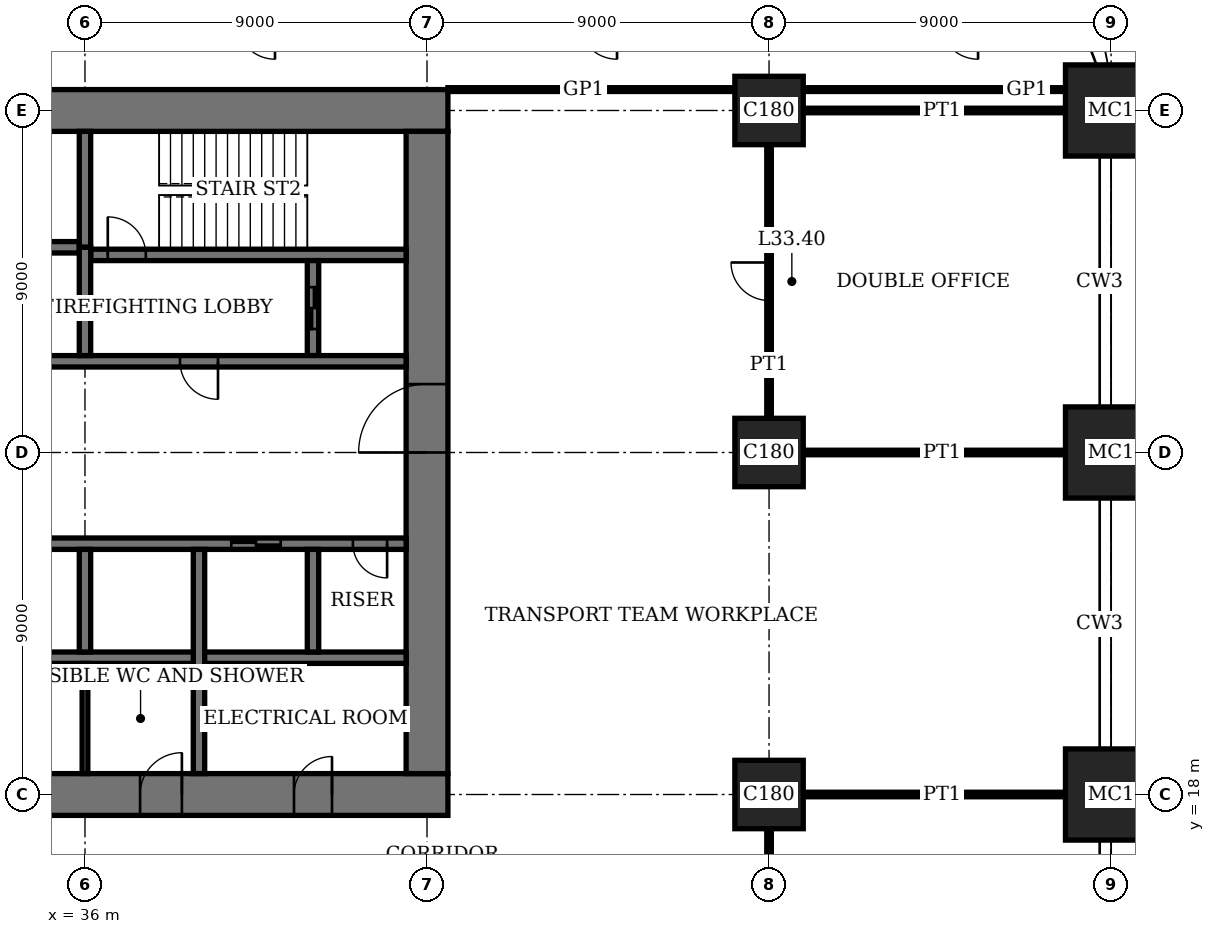
"""IFC4 building model, lengths in metres.
Left out: names, types, materials, properties, quantities, classifications, styles, units other than length and angle.
Written with IfcOpenShell. Run it as: python <this file> out.ifc"""

import sys

from ifc_helpers import new_model, si_unit, direction, frame, frame_2d, origin, origin_2d, place, context, subcontext, project, spatial, rectangle, extrude, element, fill, save


model = new_model("IFC4")
c1 = context("Model", 3, precision=1e-05, world=origin(), true_north=direction((0.0, 1.0)))
c2 = subcontext(c1, "Body", "Model", "MODEL_VIEW")
j1 = project(units=[si_unit("LENGTHUNIT", "METRE"), si_unit("PLANEANGLEUNIT", "RADIAN")], contexts=[c1])
p1 = place(None, origin())
s1 = spatial("IfcSite", under=j1, at=p1, CompositionType="ELEMENT")
p2 = place(p1, origin())
s2 = spatial("IfcBuilding", under=s1, at=p2, CompositionType="ELEMENT")
p3 = place(p2, frame((0.0, 0.0, 137.0)))
s3 = spatial("IfcBuildingStorey", under=s2, at=p3, CompositionType="ELEMENT", Elevation=137.0)
for number, where, z_axis, x_axis in (
    (1, (54.0, 18.0, 0.0), (0.0, 0.0, 1.0), (1.0, 0.0, 0.0)),
    (2, (54.0, 27.0, 0.0), (0.0, 0.0, 1.0), (1.0, 0.0, 0.0)),
    (3, (54.0, 36.0, 0.0), (0.0, 0.0, 1.0), (1.0, 0.0, 0.0)),
):
    element("IfcColumn", number, at=place(p3, frame(where, z_axis=z_axis, x_axis=x_axis)), inside=s3, PredefinedType="COLUMN", context=c2, shape_type="SweptSolid", body=[
        extrude(rectangle(XDim=1.8, YDim=1.8, at=origin_2d()), origin(), (0.0, 0.0, 1.0), 4.0),
    ])
for number, where, z_axis, x_axis in (
    (4, (63.0, 18.0, 0.0), (0.0, 0.0, 1.0), (1.0, 0.0, 0.0)),
    (5, (63.0, 27.0, 0.0), (0.0, 0.0, 1.0), (1.0, 0.0, 0.0)),
    (6, (63.0, 36.0, 0.0), (0.0, 0.0, 1.0), (1.0, 0.0, 0.0)),
):
    element("IfcColumn", number, at=place(p3, frame(where, z_axis=z_axis, x_axis=x_axis)), inside=s3, PredefinedType="COLUMN", context=c2, shape_type="SweptSolid", body=[
        extrude(rectangle(XDim=2.4, YDim=2.4, at=origin_2d()), origin(), (0.0, 0.0, 1.0), 4.0),
    ])
p4 = place(p3, frame((17.45, 18.0, 0.0), z_axis=(0.0, 0.0, 1.0), x_axis=(1.0, 0.0, 0.0)))
e7 = element("IfcWall", 7, at=p4, inside=s3, PredefinedType="SHEAR", context=c2, shape_type="SweptSolid", body=[
    extrude(rectangle(XDim=28.1, YDim=1.1, at=frame_2d((14.05, 0.0))), origin(), (0.0, 0.0, 1.0), 4.0),
])
p5 = place(p4, frame((11.55, 0.0, 0.0)))
e8 = element("IfcOpeningElement", 8, at=p5, cuts=e7, PredefinedType="OPENING", context=c2, shape_type="SweptSolid", body=[
    extrude(rectangle(XDim=1.0, YDim=2.4, at=frame_2d((0.5, 1.2))), frame((0.0, 0.56, 0.0), z_axis=(0.0, -1.0, 0.0), x_axis=(1.0, 0.0, 0.0)), (0.0, 0.0, 1.0), 1.12),
])
p6 = place(p4, frame((16.55, 0.0, 0.0)))
e9 = element("IfcOpeningElement", 9, at=p6, cuts=e7, PredefinedType="OPENING", context=c2, shape_type="SweptSolid", body=[
    extrude(rectangle(XDim=1.0, YDim=2.4, at=frame_2d((0.5, 1.2))), frame((0.0, 0.56, 0.0), z_axis=(0.0, -1.0, 0.0), x_axis=(1.0, 0.0, 0.0)), (0.0, 0.0, 1.0), 1.12),
])
p7 = place(p4, frame((20.0, 0.0, 0.0)))
e10 = element("IfcOpeningElement", 10, at=p7, cuts=e7, PredefinedType="OPENING", context=c2, shape_type="SweptSolid", body=[
    extrude(rectangle(XDim=1.1, YDim=2.4, at=frame_2d((0.55, 1.2))), frame((0.0, 0.56, 0.0), z_axis=(0.0, -1.0, 0.0), x_axis=(1.0, 0.0, 0.0)), (0.0, 0.0, 1.0), 1.12),
])
p8 = place(p4, frame((24.05, 0.0, 0.0)))
e11 = element("IfcOpeningElement", 11, at=p8, cuts=e7, PredefinedType="OPENING", context=c2, shape_type="SweptSolid", body=[
    extrude(rectangle(XDim=1.0, YDim=2.4, at=frame_2d((0.5, 1.2))), frame((0.0, 0.56, 0.0), z_axis=(0.0, -1.0, 0.0), x_axis=(1.0, 0.0, 0.0)), (0.0, 0.0, 1.0), 1.12),
])
p9 = place(p3, frame((45.55, 36.0, 0.0), z_axis=(0.0, 0.0, 1.0), x_axis=(-1.0, 0.0, 0.0)))
e12 = element("IfcWall", 12, at=p9, inside=s3, PredefinedType="SHEAR", context=c2, shape_type="SweptSolid", body=[
    extrude(rectangle(XDim=28.1, YDim=1.1, at=frame_2d((14.05, 0.0))), origin(), (0.0, 0.0, 1.0), 4.0),
])
p10 = place(p9, frame((11.55, 0.0, 0.0)))
e13 = element("IfcOpeningElement", 13, at=p10, cuts=e12, PredefinedType="OPENING", context=c2, shape_type="SweptSolid", body=[
    extrude(rectangle(XDim=1.0, YDim=2.4, at=frame_2d((0.5, 1.2))), frame((0.0, 0.56, 0.0), z_axis=(0.0, -1.0, 0.0), x_axis=(1.0, 0.0, 0.0)), (0.0, 0.0, 1.0), 1.12),
])
p11 = place(p9, frame((16.55, 0.0, 0.0)))
e14 = element("IfcOpeningElement", 14, at=p11, cuts=e12, PredefinedType="OPENING", context=c2, shape_type="SweptSolid", body=[
    extrude(rectangle(XDim=1.0, YDim=2.4, at=frame_2d((0.5, 1.2))), frame((0.0, 0.56, 0.0), z_axis=(0.0, -1.0, 0.0), x_axis=(1.0, 0.0, 0.0)), (0.0, 0.0, 1.0), 1.12),
])
p12 = place(p9, frame((20.0, 0.0, 0.0)))
e15 = element("IfcOpeningElement", 15, at=p12, cuts=e12, PredefinedType="OPENING", context=c2, shape_type="SweptSolid", body=[
    extrude(rectangle(XDim=1.1, YDim=2.4, at=frame_2d((0.55, 1.2))), frame((0.0, 0.56, 0.0), z_axis=(0.0, -1.0, 0.0), x_axis=(1.0, 0.0, 0.0)), (0.0, 0.0, 1.0), 1.12),
])
p13 = place(p9, frame((24.05, 0.0, 0.0)))
e16 = element("IfcOpeningElement", 16, at=p13, cuts=e12, PredefinedType="OPENING", context=c2, shape_type="SweptSolid", body=[
    extrude(rectangle(XDim=1.0, YDim=2.4, at=frame_2d((0.5, 1.2))), frame((0.0, 0.56, 0.0), z_axis=(0.0, -1.0, 0.0), x_axis=(1.0, 0.0, 0.0)), (0.0, 0.0, 1.0), 1.12),
])
p14 = place(p3, frame((45.0, 18.55, 0.0), z_axis=(0.0, 0.0, 1.0), x_axis=(0.0, 1.0, 0.0)))
e17 = element("IfcWall", 17, at=p14, inside=s3, PredefinedType="SHEAR", context=c2, shape_type="SweptSolid", body=[
    extrude(rectangle(XDim=16.9, YDim=1.1, at=frame_2d((8.45, 0.0))), origin(), (0.0, 0.0, 1.0), 4.0),
])
p15 = place(p14, frame((8.45, 0.0, 0.0)))
e18 = element("IfcOpeningElement", 18, at=p15, cuts=e17, PredefinedType="OPENING", context=c2, shape_type="SweptSolid", body=[
    extrude(rectangle(XDim=1.8, YDim=2.4, at=frame_2d((0.9, 1.2))), frame((0.0, 0.56, 0.0), z_axis=(0.0, -1.0, 0.0), x_axis=(1.0, 0.0, 0.0)), (0.0, 0.0, 1.0), 1.12),
])
p16 = place(p3, frame((36.15, 32.2, 0.0), z_axis=(0.0, 0.0, 1.0), x_axis=(1.0, 0.0, 0.0)))
e19 = element("IfcWall", 19, at=p16, inside=s3, PredefinedType="SHEAR", context=c2, shape_type="SweptSolid", body=[
    extrude(rectangle(XDim=8.3, YDim=0.3, at=frame_2d((4.15, 0.0))), origin(), (0.0, 0.0, 1.0), 4.0),
])
p17 = place(p16, frame((0.45, 0.0, 0.0)))
e20 = element("IfcOpeningElement", 20, at=p17, cuts=e19, PredefinedType="OPENING", context=c2, shape_type="SweptSolid", body=[
    extrude(rectangle(XDim=1.0, YDim=2.4, at=frame_2d((0.5, 1.2))), frame((0.0, 0.16, 0.0), z_axis=(0.0, -1.0, 0.0), x_axis=(1.0, 0.0, 0.0)), (0.0, 0.0, 1.0), 0.32),
])
p18 = place(p3, frame((36.0, 32.4, 0.0), z_axis=(0.0, 0.0, 1.0), x_axis=(0.0, 1.0, 0.0)))
e21 = element("IfcWall", 21, at=p18, inside=s3, PredefinedType="SHEAR", context=c2, shape_type="SweptSolid", body=[
    extrude(rectangle(XDim=3.05, YDim=0.3, at=frame_2d((1.525, 0.0))), origin(), (0.0, 0.0, 1.0), 4.0),
])
p19 = place(p3, frame((42.0, 29.55, 0.0), z_axis=(0.0, 0.0, 1.0), x_axis=(0.0, 1.0, 0.0)))
e22 = element("IfcWall", 22, at=p19, inside=s3, PredefinedType="SHEAR", context=c2, shape_type="SweptSolid", body=[
    extrude(rectangle(XDim=2.5, YDim=0.3, at=frame_2d((1.25, 0.0))), origin(), (0.0, 0.0, 1.0), 4.0),
])
p20 = place(p19, frame((0.7, 0.0, 0.0)))
e23 = element("IfcOpeningElement", 23, at=p20, cuts=e22, PredefinedType="OPENING", context=c2, shape_type="SweptSolid", body=[
    extrude(rectangle(XDim=1.1, YDim=2.4, at=frame_2d((0.55, 1.2))), frame((0.0, 0.16, 0.0), z_axis=(0.0, -1.0, 0.0), x_axis=(1.0, 0.0, 0.0)), (0.0, 0.0, 1.0), 0.32),
])
p21 = place(p3, frame((18.55, 24.6, 0.0), z_axis=(0.0, 0.0, 1.0), x_axis=(1.0, 0.0, 0.0)))
e24 = element("IfcWall", 24, at=p21, inside=s3, PredefinedType="SHEAR", context=c2, shape_type="SweptSolid", body=[
    extrude(rectangle(XDim=25.9, YDim=0.3, at=frame_2d((12.95, 0.0))), origin(), (0.0, 0.0, 1.0), 4.0),
])
p22 = place(p21, frame((4.95, 0.0, 0.0)))
e25 = element("IfcOpeningElement", 25, at=p22, cuts=e24, PredefinedType="OPENING", context=c2, shape_type="SweptSolid", body=[
    extrude(rectangle(XDim=1.0, YDim=2.4, at=frame_2d((0.5, 1.2))), frame((0.0, 0.16, 0.0), z_axis=(0.0, -1.0, 0.0), x_axis=(1.0, 0.0, 0.0)), (0.0, 0.0, 1.0), 0.32),
])
p23 = place(p21, frame((24.5, 0.0, 0.0)))
e26 = element("IfcOpeningElement", 26, at=p23, cuts=e24, PredefinedType="OPENING", context=c2, shape_type="SweptSolid", body=[
    extrude(rectangle(XDim=0.9, YDim=2.1, at=frame_2d((0.45, 1.05))), frame((0.0, 0.16, 0.0), z_axis=(0.0, -1.0, 0.0), x_axis=(1.0, 0.0, 0.0)), (0.0, 0.0, 1.0), 0.32),
])
p24 = place(p21, frame((21.3, 0.0, 0.0)))
e27 = element("IfcOpeningElement", 27, at=p24, cuts=e24, PredefinedType="OPENING", context=c2, shape_type="SweptSolid", body=[
    extrude(rectangle(XDim=1.3, YDim=2.4, at=frame_2d((0.65, 1.2))), frame((0.0, 0.16, 0.0), z_axis=(0.0, -1.0, 0.0), x_axis=(1.0, 0.0, 0.0)), (0.0, 0.0, 1.0), 0.32),
])
p25 = place(p3, frame((18.55, 29.4, 0.0), z_axis=(0.0, 0.0, 1.0), x_axis=(1.0, 0.0, 0.0)))
e28 = element("IfcWall", 28, at=p25, inside=s3, PredefinedType="SHEAR", context=c2, shape_type="SweptSolid", body=[
    extrude(rectangle(XDim=25.9, YDim=0.3, at=frame_2d((12.95, 0.0))), origin(), (0.0, 0.0, 1.0), 4.0),
])
p26 = place(p25, frame((19.95, 0.0, 0.0)))
e29 = element("IfcOpeningElement", 29, at=p26, cuts=e28, PredefinedType="OPENING", context=c2, shape_type="SweptSolid", body=[
    extrude(rectangle(XDim=1.0, YDim=2.4, at=frame_2d((0.5, 1.2))), frame((0.0, 0.16, 0.0), z_axis=(0.0, -1.0, 0.0), x_axis=(1.0, 0.0, 0.0)), (0.0, 0.0, 1.0), 0.32),
])
p27 = place(p25, frame((0.5, 0.0, 0.0)))
e30 = element("IfcOpeningElement", 30, at=p27, cuts=e28, PredefinedType="OPENING", context=c2, shape_type="SweptSolid", body=[
    extrude(rectangle(XDim=0.9, YDim=2.1, at=frame_2d((0.45, 1.05))), frame((0.0, 0.16, 0.0), z_axis=(0.0, -1.0, 0.0), x_axis=(1.0, 0.0, 0.0)), (0.0, 0.0, 1.0), 0.32),
])
p28 = place(p25, frame((15.4, 0.0, 0.0)))
e31 = element("IfcOpeningElement", 31, at=p28, cuts=e28, PredefinedType="OPENING", context=c2, shape_type="SweptSolid", body=[
    extrude(rectangle(XDim=1.1, YDim=2.4, at=frame_2d((0.55, 1.2))), frame((0.0, 0.16, 0.0), z_axis=(0.0, -1.0, 0.0), x_axis=(1.0, 0.0, 0.0)), (0.0, 0.0, 1.0), 0.32),
])
p29 = place(p25, frame((12.4, 0.0, 0.0)))
e32 = element("IfcOpeningElement", 32, at=p29, cuts=e28, PredefinedType="OPENING", context=c2, shape_type="SweptSolid", body=[
    extrude(rectangle(XDim=1.1, YDim=2.4, at=frame_2d((0.55, 1.2))), frame((0.0, 0.16, 0.0), z_axis=(0.0, -1.0, 0.0), x_axis=(1.0, 0.0, 0.0)), (0.0, 0.0, 1.0), 0.32),
])
p30 = place(p25, frame((3.3, 0.0, 0.0)))
e33 = element("IfcOpeningElement", 33, at=p30, cuts=e28, PredefinedType="OPENING", context=c2, shape_type="SweptSolid", body=[
    extrude(rectangle(XDim=1.3, YDim=2.4, at=frame_2d((0.65, 1.2))), frame((0.0, 0.16, 0.0), z_axis=(0.0, -1.0, 0.0), x_axis=(1.0, 0.0, 0.0)), (0.0, 0.0, 1.0), 0.32),
])
for number, where, z_axis, x_axis in (
    (34, (27.15, 21.6, 0.0), (0.0, 0.0, 1.0), (1.0, 0.0, 0.0)),
    (35, (18.55, 32.4, 0.0), (0.0, 0.0, 1.0), (1.0, 0.0, 0.0)),
):
    element("IfcWall", number, at=place(p3, frame(where, z_axis=z_axis, x_axis=x_axis)), inside=s3, PredefinedType="SHEAR", context=c2, shape_type="SweptSolid", body=[
        extrude(rectangle(XDim=17.3, YDim=0.3, at=frame_2d((8.65, 0.0))), origin(), (0.0, 0.0, 1.0), 4.0),
    ])
p31 = place(p3, frame((36.0, 21.75, 0.0), z_axis=(0.0, 0.0, 1.0), x_axis=(0.0, 1.0, 0.0)))
e36 = element("IfcWall", 36, at=p31, inside=s3, PredefinedType="SHEAR", context=c2, shape_type="SweptSolid", body=[
    extrude(rectangle(XDim=2.7, YDim=0.3, at=frame_2d((1.35, 0.0))), origin(), (0.0, 0.0, 1.0), 4.0),
])
p32 = place(p3, frame((39.0, 18.55, 0.0), z_axis=(0.0, 0.0, 1.0), x_axis=(0.0, 1.0, 0.0)))
e37 = element("IfcWall", 37, at=p32, inside=s3, PredefinedType="SHEAR", context=c2, shape_type="SweptSolid", body=[
    extrude(rectangle(XDim=5.9, YDim=0.3, at=frame_2d((2.95, 0.0))), origin(), (0.0, 0.0, 1.0), 4.0),
])
p33 = place(p3, frame((42.0, 21.75, 0.0), z_axis=(0.0, 0.0, 1.0), x_axis=(0.0, 1.0, 0.0)))
e38 = element("IfcWall", 38, at=p33, inside=s3, PredefinedType="SHEAR", context=c2, shape_type="SweptSolid", body=[
    extrude(rectangle(XDim=2.7, YDim=0.3, at=frame_2d((1.35, 0.0))), origin(), (0.0, 0.0, 1.0), 4.0),
])
p34 = place(p3, frame((36.0, 29.55, 0.0), z_axis=(0.0, 0.0, 1.0), x_axis=(0.0, 1.0, 0.0)))
e39 = element("IfcWall", 39, at=p34, inside=s3, PredefinedType="SHEAR", context=c2, shape_type="SweptSolid", body=[
    extrude(rectangle(XDim=2.85, YDim=0.3, at=frame_2d((1.425, 0.0))), origin(), (0.0, 0.0, 1.0), 4.0),
])
for number, where, z_axis, x_axis in (
    (40, (54.9, 18.0, 0.0), (0.0, 0.0, 1.0), (1.0, 0.0, 0.0)),
    (41, (54.9, 27.0, 0.0), (0.0, 0.0, 1.0), (1.0, 0.0, 0.0)),
    (42, (54.9, 36.0, 0.0), (0.0, 0.0, 1.0), (1.0, 0.0, 0.0)),
):
    element("IfcWall", number, at=place(p3, frame(where, z_axis=z_axis, x_axis=x_axis)), inside=s3, PredefinedType="PARTITIONING", context=c2, shape_type="SweptSolid", body=[
        extrude(rectangle(XDim=6.9, YDim=0.12, at=frame_2d((3.45, 0.0))), origin(), (0.0, 0.0, 1.0), 3.05),
    ])
p35 = place(p3, frame((45.55, 36.55, 0.0), z_axis=(0.0, 0.0, 1.0), x_axis=(1.0, 0.0, 0.0)))
e43 = element("IfcWall", 43, at=p35, inside=s3, PredefinedType="PARTITIONING", context=c2, shape_type="SweptSolid", body=[
    extrude(rectangle(XDim=7.55, YDim=0.1, at=frame_2d((3.775, 0.0))), origin(), (0.0, 0.0, 1.0), 3.75),
])
p36 = place(p3, frame((54.9, 36.55, 0.0), z_axis=(0.0, 0.0, 1.0), x_axis=(1.0, 0.0, 0.0)))
e44 = element("IfcWall", 44, at=p36, inside=s3, PredefinedType="PARTITIONING", context=c2, shape_type="SweptSolid", body=[
    extrude(rectangle(XDim=6.9, YDim=0.1, at=frame_2d((3.45, 0.0))), origin(), (0.0, 0.0, 1.0), 3.75),
])
p37 = place(p3, frame((54.0, 9.9, 0.0), z_axis=(0.0, 0.0, 1.0), x_axis=(0.0, 1.0, 0.0)))
e45 = element("IfcWall", 45, at=p37, inside=s3, PredefinedType="PARTITIONING", context=c2, shape_type="SweptSolid", body=[
    extrude(rectangle(XDim=7.2, YDim=0.12, at=frame_2d((3.6, 0.0))), origin(), (0.0, 0.0, 1.0), 3.05),
])
p38 = place(p37, frame((3.1, 0.0, 0.0)))
e46 = element("IfcOpeningElement", 46, at=p38, cuts=e45, PredefinedType="OPENING", context=c2, shape_type="SweptSolid", body=[
    extrude(rectangle(XDim=1.0, YDim=2.4, at=frame_2d((0.5, 1.2))), frame((0.0, 0.07, 0.0), z_axis=(0.0, -1.0, 0.0), x_axis=(1.0, 0.0, 0.0)), (0.0, 0.0, 1.0), 0.14),
])
p39 = place(p3, frame((54.0, 27.9, 0.0), z_axis=(0.0, 0.0, 1.0), x_axis=(0.0, 1.0, 0.0)))
e47 = element("IfcWall", 47, at=p39, inside=s3, PredefinedType="PARTITIONING", context=c2, shape_type="SweptSolid", body=[
    extrude(rectangle(XDim=7.2, YDim=0.12, at=frame_2d((3.6, 0.0))), origin(), (0.0, 0.0, 1.0), 3.05),
])
p40 = place(p39, frame((3.1, 0.0, 0.0)))
e48 = element("IfcOpeningElement", 48, at=p40, cuts=e47, PredefinedType="OPENING", context=c2, shape_type="SweptSolid", body=[
    extrude(rectangle(XDim=1.0, YDim=2.4, at=frame_2d((0.5, 1.2))), frame((0.0, 0.07, 0.0), z_axis=(0.0, -1.0, 0.0), x_axis=(1.0, 0.0, 0.0)), (0.0, 0.0, 1.0), 0.14),
])
p41 = place(p3, frame((36.0, 18.55, 0.0), z_axis=(0.0, 0.0, 1.0), x_axis=(0.0, 1.0, 0.0)))
e49 = element("IfcWall", 49, at=p41, inside=s3, PredefinedType="PARTITIONING", context=c2, shape_type="SweptSolid", body=[
    extrude(rectangle(XDim=2.9, YDim=0.15, at=frame_2d((1.45, 0.0))), origin(), (0.0, 0.0, 1.0), 3.75),
])
p42 = place(p15, origin())
e50 = element("IfcDoor", 50, at=p42, inside=s3, OperationType="DOUBLE_DOOR_DOUBLE_SWING", PredefinedType="DOOR", context=c2, shape_type="SweptSolid", body=[
    extrude(rectangle(XDim=1.8, YDim=2.4, at=frame_2d((0.9, 1.2))), frame((0.0, 0.03, 0.0), z_axis=(0.0, -1.0, 0.0), x_axis=(1.0, 0.0, 0.0)), (0.0, 0.0, 1.0), 0.06),
    extrude(rectangle(XDim=0.04, YDim=2.4, at=frame_2d((0.02, 1.2))), frame((0.0, 0.55, 0.0), z_axis=(0.0, -1.0, 0.0), x_axis=(1.0, 0.0, 0.0)), (0.0, 0.0, 1.0), 1.1),
    extrude(rectangle(XDim=0.04, YDim=2.4, at=frame_2d((1.78, 1.2))), frame((0.0, 0.55, 0.0), z_axis=(0.0, -1.0, 0.0), x_axis=(1.0, 0.0, 0.0)), (0.0, 0.0, 1.0), 1.1),
    extrude(rectangle(XDim=1.8, YDim=0.04, at=frame_2d((0.9, 2.38))), frame((0.0, 0.55, 0.0), z_axis=(0.0, -1.0, 0.0), x_axis=(1.0, 0.0, 0.0)), (0.0, 0.0, 1.0), 1.1),
])
fill(e18, e50)
p43 = place(p7, origin())
e51 = element("IfcDoor", 51, at=p43, inside=s3, OperationType="SINGLE_SWING_LEFT", PredefinedType="DOOR", context=c2, shape_type="SweptSolid", body=[
    extrude(rectangle(XDim=1.1, YDim=2.4, at=frame_2d((0.55, 1.2))), frame((0.0, 0.025, 0.0), z_axis=(0.0, -1.0, 0.0), x_axis=(1.0, 0.0, 0.0)), (0.0, 0.0, 1.0), 0.05),
    extrude(rectangle(XDim=0.04, YDim=2.4, at=frame_2d((0.02, 1.2))), frame((0.0, 0.44, 0.0), z_axis=(0.0, -1.0, 0.0), x_axis=(1.0, 0.0, 0.0)), (0.0, 0.0, 1.0), 0.88),
    extrude(rectangle(XDim=0.04, YDim=2.4, at=frame_2d((1.08, 1.2))), frame((0.0, 0.44, 0.0), z_axis=(0.0, -1.0, 0.0), x_axis=(1.0, 0.0, 0.0)), (0.0, 0.0, 1.0), 0.88),
    extrude(rectangle(XDim=1.1, YDim=0.04, at=frame_2d((0.55, 2.38))), frame((0.0, 0.44, 0.0), z_axis=(0.0, -1.0, 0.0), x_axis=(1.0, 0.0, 0.0)), (0.0, 0.0, 1.0), 0.88),
])
fill(e10, e51)
p44 = place(p8, origin())
e52 = element("IfcDoor", 52, at=p44, inside=s3, OperationType="SINGLE_SWING_LEFT", PredefinedType="DOOR", context=c2, shape_type="SweptSolid", body=[
    extrude(rectangle(XDim=1.0, YDim=2.4, at=frame_2d((0.5, 1.2))), frame((0.0, 0.025, 0.0), z_axis=(0.0, -1.0, 0.0), x_axis=(1.0, 0.0, 0.0)), (0.0, 0.0, 1.0), 0.05),
    extrude(rectangle(XDim=0.04, YDim=2.4, at=frame_2d((0.02, 1.2))), frame((0.0, 0.4, 0.0), z_axis=(0.0, -1.0, 0.0), x_axis=(1.0, 0.0, 0.0)), (0.0, 0.0, 1.0), 0.8),
    extrude(rectangle(XDim=0.04, YDim=2.4, at=frame_2d((0.98, 1.2))), frame((0.0, 0.4, 0.0), z_axis=(0.0, -1.0, 0.0), x_axis=(1.0, 0.0, 0.0)), (0.0, 0.0, 1.0), 0.8),
    extrude(rectangle(XDim=1.0, YDim=0.04, at=frame_2d((0.5, 2.38))), frame((0.0, 0.4, 0.0), z_axis=(0.0, -1.0, 0.0), x_axis=(1.0, 0.0, 0.0)), (0.0, 0.0, 1.0), 0.8),
])
fill(e11, e52)
p45 = place(p17, origin())
e53 = element("IfcDoor", 53, at=p45, inside=s3, OperationType="SINGLE_SWING_RIGHT", PredefinedType="DOOR", context=c2, shape_type="SweptSolid", body=[
    extrude(rectangle(XDim=1.0, YDim=2.4, at=frame_2d((0.5, 1.2))), frame((0.0, 0.03, 0.0), z_axis=(0.0, -1.0, 0.0), x_axis=(1.0, 0.0, 0.0)), (0.0, 0.0, 1.0), 0.06),
])
fill(e20, e53)
p46 = place(p26, origin())
e54 = element("IfcDoor", 54, at=p46, inside=s3, OperationType="SINGLE_SWING_RIGHT", PredefinedType="DOOR", context=c2, shape_type="SweptSolid", body=[
    extrude(rectangle(XDim=1.0, YDim=2.4, at=frame_2d((0.5, 1.2))), frame((0.0, 0.03, 0.0), z_axis=(0.0, -1.0, 0.0), x_axis=(1.0, 0.0, 0.0)), (0.0, 0.0, 1.0), 0.06),
])
fill(e29, e54)
p47 = place(p23, origin())
e55 = element("IfcDoor", 55, at=p47, inside=s3, OperationType="SINGLE_SWING_RIGHT", PredefinedType="DOOR", context=c2, shape_type="SweptSolid", body=[
    extrude(rectangle(XDim=0.9, YDim=2.1, at=frame_2d((0.45, 1.05))), frame((0.0, 0.03, 0.0), z_axis=(0.0, -1.0, 0.0), x_axis=(1.0, 0.0, 0.0)), (0.0, 0.0, 1.0), 0.06),
])
fill(e26, e55)
p48 = place(p40, origin())
e56 = element("IfcDoor", 56, at=p48, inside=s3, OperationType="SINGLE_SWING_LEFT", PredefinedType="DOOR", context=c2, shape_type="SweptSolid", body=[
    extrude(rectangle(XDim=1.0, YDim=2.4, at=frame_2d((0.5, 1.2))), frame((0.0, 0.025, 0.0), z_axis=(0.0, -1.0, 0.0), x_axis=(1.0, 0.0, 0.0)), (0.0, 0.0, 1.0), 0.05),
])
fill(e48, e56)
p49 = place(p24, origin())
e57 = element("IfcDoor", 57, at=p49, inside=s3, OperationType="DOUBLE_DOOR_SLIDING", PredefinedType="DOOR", context=c2, shape_type="SweptSolid", body=[
    extrude(rectangle(XDim=1.3, YDim=2.4, at=frame_2d((0.65, 1.2))), frame((0.0, 0.02, 0.0), z_axis=(0.0, -1.0, 0.0), x_axis=(1.0, 0.0, 0.0)), (0.0, 0.0, 1.0), 0.04),
])
fill(e27, e57)
p50 = place(p20, origin())
e58 = element("IfcDoor", 58, at=p50, inside=s3, OperationType="DOUBLE_DOOR_SLIDING", PredefinedType="DOOR", context=c2, shape_type="SweptSolid", body=[
    extrude(rectangle(XDim=1.1, YDim=2.4, at=frame_2d((0.55, 1.2))), frame((0.0, 0.03, 0.0), z_axis=(0.0, -1.0, 0.0), x_axis=(1.0, 0.0, 0.0)), (0.0, 0.0, 1.0), 0.06),
])
fill(e23, e58)
save(model, sys.argv[1])
